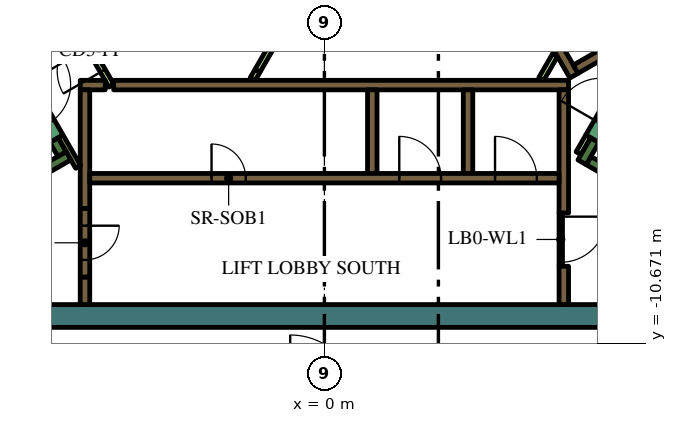
"""IFC4 building model, lengths in metres.
Left out: names, types, materials, properties, quantities, classifications, styles, units other than length and angle.
Written with IfcOpenShell. Run it as: python <this file> out.ifc"""

import sys

from ifc_helpers import new_model, si_unit, direction, frame, frame_2d, origin, place, context, subcontext, project, spatial, rectangle, extrude, element, fill, save


model = new_model("IFC4")
c1 = context("Model", 3, precision=1e-05, world=origin(), true_north=direction((0.0, 1.0)))
c2 = subcontext(c1, "Body", "Model", "MODEL_VIEW")
j1 = project(units=[si_unit("LENGTHUNIT", "METRE"), si_unit("PLANEANGLEUNIT", "RADIAN")], contexts=[c1])
p1 = place(None, origin())
s1 = spatial("IfcSite", under=j1, at=p1, CompositionType="ELEMENT")
p2 = place(p1, origin())
s2 = spatial("IfcBuilding", under=s1, at=p2, CompositionType="ELEMENT")
p3 = place(p2, frame((0.0, 0.0, 327.6)))
s3 = spatial("IfcBuildingStorey", under=s2, at=p3, CompositionType="ELEMENT", Elevation=327.6)
p4 = place(p3, frame((8.904, -9.95, 0.0), z_axis=(0.0, 0.0, 1.0), x_axis=(-1.0, 0.0, 0.0)))
e1 = element("IfcWall", 1, at=p4, inside=s3, PredefinedType="SOLIDWALL", context=c2, shape_type="SweptSolid", body=[
    extrude(rectangle(XDim=22.161, YDim=0.6, at=frame_2d((11.081, 0.0))), origin(), (0.0, 0.0, 1.0), 4.2),
])
p5 = place(p3, frame((12.84, -9.261, 0.0), z_axis=(0.0, 0.0, 1.0), x_axis=(-0.866013990052, 0.500019768644, 0.0)))
e2 = element("IfcWall", 2, at=p5, inside=s3, PredefinedType="SOLIDWALL", context=c2, shape_type="SweptSolid", body=[
    extrude(rectangle(XDim=6.8, YDim=0.25, at=frame_2d((3.4, 0.0))), origin(), (0.0, 0.0, 1.0), 4.2),
])
p6 = place(p3, frame((6.78, -5.906, 0.0), z_axis=(0.0, 0.0, 1.0), x_axis=(0.500223362819, 0.865896406789, 0.0)))
e3 = element("IfcWall", 3, at=p6, inside=s3, PredefinedType="SOLIDWALL", context=c2, shape_type="SweptSolid", body=[
    extrude(rectangle(XDim=0.675, YDim=0.25, at=frame_2d((0.337, 0.0))), origin(), (0.0, 0.0, 1.0), 4.2),
])
p7 = place(p3, frame((-12.84, -9.261, 0.0), z_axis=(0.0, 0.0, 1.0), x_axis=(0.866016039709, 0.500016218704, 0.0)))
e4 = element("IfcWall", 4, at=p7, inside=s3, PredefinedType="SOLIDWALL", context=c2, shape_type="SweptSolid", body=[
    extrude(rectangle(XDim=7.05, YDim=0.25, at=frame_2d((3.525, 0.0))), origin(), (0.0, 0.0, 1.0), 4.2),
])
p8 = place(p3, frame((-6.905, -5.69, 0.0), z_axis=(0.0, 0.0, 1.0), x_axis=(-0.500402024738, 0.865793170242, 0.0)))
e5 = element("IfcWall", 5, at=p8, inside=s3, PredefinedType="SOLIDWALL", context=c2, shape_type="SweptSolid", body=[
    extrude(rectangle(XDim=0.425, YDim=0.25, at=frame_2d((0.212, 0.0))), origin(), (0.0, 0.0, 1.0), 4.2),
])
p9 = place(p3, frame((-5.545, -3.875, 0.0), z_axis=(0.0, 0.0, 1.0), x_axis=(1.0, 0.0, 0.0)))
e6 = element("IfcWall", 6, at=p9, inside=s3, PredefinedType="SOLIDWALL", context=c2, shape_type="SweptSolid", body=[
    extrude(rectangle(XDim=11.97, YDim=0.25, at=frame_2d((5.985, 0.0))), origin(), (0.0, 0.0, 1.0), 4.2),
])
p10 = place(p3, frame((-6.425, -3.875, 0.0), z_axis=(0.0, 0.0, 1.0), x_axis=(1.0, 0.0, 0.0)))
e7 = element("IfcWall", 7, at=p10, inside=s3, PredefinedType="SOLIDWALL", context=c2, shape_type="SweptSolid", body=[
    extrude(rectangle(XDim=0.658, YDim=0.25, at=frame_2d((0.329, 0.0))), origin(), (0.0, 0.0, 1.0), 4.2),
])
p11 = place(p3, frame((6.3, -7.24, 0.0), z_axis=(0.0, 0.0, 1.0), x_axis=(0.0, 1.0, 0.0)))
e8 = element("IfcWall", 8, at=p11, inside=s3, PredefinedType="SOLIDWALL", context=c2, shape_type="SweptSolid", body=[
    extrude(rectangle(XDim=3.24, YDim=0.25, at=frame_2d((1.62, 0.0))), origin(), (0.0, 0.0, 1.0), 4.2),
])
p12 = place(p3, frame((6.3, -9.65, 0.0), z_axis=(0.0, 0.0, 1.0), x_axis=(0.0, 1.0, 0.0)))
e9 = element("IfcWall", 9, at=p12, inside=s3, PredefinedType="SOLIDWALL", context=c2, shape_type="SweptSolid", body=[
    extrude(rectangle(XDim=1.008, YDim=0.25, at=frame_2d((0.504, 0.0))), origin(), (0.0, 0.0, 1.0), 4.2),
])
for number, where, z_axis, x_axis in (
    (10, (3.78, -4.0, 0.0), (0.0, 0.0, 1.0), (0.0, -1.0, 0.0)),
    (11, (1.26, -4.0, 0.0), (0.0, 0.0, 1.0), (0.0, -1.0, 0.0)),
):
    element("IfcWall", number, at=place(p3, frame(where, z_axis=z_axis, x_axis=x_axis)), inside=s3, PredefinedType="SOLIDWALL", context=c2, shape_type="SweptSolid", body=[
        extrude(rectangle(XDim=2.2, YDim=0.25, at=frame_2d((1.1, 0.0))), origin(), (0.0, 0.0, 1.0), 4.2),
    ])
p13 = place(p3, frame((-6.3, -7.125, 0.0), z_axis=(0.0, 0.0, 1.0), x_axis=(0.0, 1.0, 0.0)))
e12 = element("IfcWall", 12, at=p13, inside=s3, PredefinedType="SOLIDWALL", context=c2, shape_type="SweptSolid", body=[
    extrude(rectangle(XDim=3.125, YDim=0.25, at=frame_2d((1.562, 0.0))), origin(), (0.0, 0.0, 1.0), 4.2),
])
p14 = place(p3, frame((-6.3, -8.925, 0.0), z_axis=(0.0, 0.0, 1.0), x_axis=(0.0, -1.0, 0.0)))
e13 = element("IfcWall", 13, at=p14, inside=s3, PredefinedType="SOLIDWALL", context=c2, shape_type="SweptSolid", body=[
    extrude(rectangle(XDim=0.725, YDim=0.25, at=frame_2d((0.363, 0.0))), origin(), (0.0, 0.0, 1.0), 4.2),
])
p15 = place(p3, frame((6.568, -3.627, 0.0), z_axis=(0.0, 0.0, 1.0), x_axis=(-0.499999455981, 0.866025717874, 0.0)))
e14 = element("IfcWall", 14, at=p15, inside=s3, PredefinedType="SOLIDWALL", context=c2, shape_type="SweptSolid", body=[
    extrude(rectangle(XDim=11.978, YDim=0.25, at=frame_2d((5.989, 0.0))), origin(), (0.0, 0.0, 1.0), 4.2),
])
p16 = place(p3, frame((6.614, -3.456, 0.0), z_axis=(0.0, 0.0, 1.0), x_axis=(0.866025089694, 0.500000544019, 0.0)))
e15 = element("IfcWall", 15, at=p16, inside=s3, PredefinedType="SOLIDWALL", context=c2, shape_type="SweptSolid", body=[
    extrude(rectangle(XDim=2.305, YDim=0.25, at=frame_2d((1.153, 0.0))), origin(), (0.0, 0.0, 1.0), 4.2),
])
p17 = place(p3, frame((-6.48, -6.027, 0.0), z_axis=(0.0, 0.0, 1.0), x_axis=(-0.499927229454, 0.866067413802, 0.0)))
e16 = element("IfcWall", 16, at=p17, inside=s3, PredefinedType="PARTITIONING", context=c2, shape_type="SweptSolid", body=[
    extrude(rectangle(XDim=0.929, YDim=0.15, at=frame_2d((0.464, 0.0))), origin(), (0.0, 0.0, 1.0), 4.2),
])
p18 = place(p3, frame((6.945, -5.222, 0.0), z_axis=(0.0, 0.0, 1.0), x_axis=(-0.499818422106, -0.866130212453, 0.0)))
e17 = element("IfcWall", 17, at=p18, inside=s3, PredefinedType="PARTITIONING", context=c2, shape_type="SweptSolid", body=[
    extrude(rectangle(XDim=0.514, YDim=0.15, at=frame_2d((0.257, 0.0))), origin(), (0.0, 0.0, 1.0), 3.45),
])
p19 = place(p3, frame((5.705, -3.718, 0.0), z_axis=(0.0, 0.0, 1.0), x_axis=(0.499962090823, 0.866047289552, 0.0)))
e18 = element("IfcWall", 18, at=p19, inside=s3, PredefinedType="PARTITIONING", context=c2, shape_type="SweptSolid", body=[
    extrude(rectangle(XDim=0.735, YDim=0.15, at=frame_2d((0.367, 0.0))), origin(), (0.0, 0.0, 1.0), 3.45),
])
p20 = place(p3, frame((-1.887, -3.718, 0.0), z_axis=(0.0, 0.0, 1.0), x_axis=(0.500165633897, 0.865929753888, 0.0)))
e19 = element("IfcWall", 19, at=p20, inside=s3, PredefinedType="PARTITIONING", context=c2, shape_type="SweptSolid", body=[
    extrude(rectangle(XDim=0.254, YDim=0.15, at=frame_2d((0.127, 0.0))), origin(), (0.0, 0.0, 1.0), 3.45),
])
p21 = place(p3, frame((-6.175, -6.325, 0.0), z_axis=(0.0, 0.0, 1.0), x_axis=(1.0, 0.0, 0.0)))
e20 = element("IfcWall", 20, at=p21, inside=s3, PredefinedType="SOLIDWALL", context=c2, shape_type="SweptSolid", body=[
    extrude(rectangle(XDim=12.35, YDim=0.25, at=frame_2d((6.175, 0.0))), origin(), (0.0, 0.0, 1.0), 4.2),
])
p22 = place(p21, frame((3.205, 0.0, 0.0)))
e21 = element("IfcOpeningElement", 21, at=p22, cuts=e20, PredefinedType="OPENING", context=c2, shape_type="SweptSolid", body=[
    extrude(rectangle(XDim=0.9, YDim=2.1, at=frame_2d((0.45, 1.05))), frame((0.0, 0.135, 0.0), z_axis=(0.0, -1.0, 0.0), x_axis=(1.0, 0.0, 0.0)), (0.0, 0.0, 1.0), 0.27),
])
p23 = place(p21, frame((8.145, 0.0, 0.0)))
e22 = element("IfcOpeningElement", 22, at=p23, cuts=e20, PredefinedType="OPENING", context=c2, shape_type="SweptSolid", body=[
    extrude(rectangle(XDim=1.1, YDim=2.1, at=frame_2d((0.55, 1.05))), frame((0.0, 0.135, 0.0), z_axis=(0.0, -1.0, 0.0), x_axis=(1.0, 0.0, 0.0)), (0.0, 0.0, 1.0), 0.27),
])
p24 = place(p21, frame((10.665, 0.0, 0.0)))
e23 = element("IfcOpeningElement", 23, at=p24, cuts=e20, PredefinedType="OPENING", context=c2, shape_type="SweptSolid", body=[
    extrude(rectangle(XDim=1.1, YDim=2.1, at=frame_2d((0.55, 1.05))), frame((0.0, 0.135, 0.0), z_axis=(0.0, -1.0, 0.0), x_axis=(1.0, 0.0, 0.0)), (0.0, 0.0, 1.0), 0.27),
])
p25 = place(p3, frame((7.053, -5.284, 0.0), z_axis=(0.0, 0.0, 1.0), x_axis=(0.500078061341, 0.865980330357, 0.0)))
e24 = element("IfcWall", 24, at=p25, inside=s3, PredefinedType="SOLIDWALL", context=c2, shape_type="SweptSolid", body=[
    extrude(rectangle(XDim=2.1, YDim=0.4, at=frame_2d((1.05, 0.0))), origin(), (0.0, 0.0, 1.0), 4.2),
])
p26 = place(p25, frame((0.45, 0.0, 0.0)))
e25 = element("IfcOpeningElement", 25, at=p26, cuts=e24, PredefinedType="OPENING", context=c2, shape_type="SweptSolid", body=[
    extrude(rectangle(XDim=1.2, YDim=2.1, at=frame_2d((0.6, 1.05))), frame((0.0, 0.21, 0.0), z_axis=(0.0, -1.0, 0.0), x_axis=(1.0, 0.0, 0.0)), (0.0, 0.0, 1.0), 0.42),
])
p27 = place(p3, frame((-8.103, -3.466, 0.0), z_axis=(0.0, 0.0, 1.0), x_axis=(0.500078061341, -0.865980330357, 0.0)))
e26 = element("IfcWall", 26, at=p27, inside=s3, PredefinedType="SOLIDWALL", context=c2, shape_type="SweptSolid", body=[
    extrude(rectangle(XDim=2.1, YDim=0.4, at=frame_2d((1.05, 0.0))), origin(), (0.0, 0.0, 1.0), 4.2),
])
p28 = place(p27, frame((0.45, 0.0, 0.0)))
e27 = element("IfcOpeningElement", 27, at=p28, cuts=e26, PredefinedType="OPENING", context=c2, shape_type="SweptSolid", body=[
    extrude(rectangle(XDim=1.2, YDim=2.1, at=frame_2d((0.6, 1.05))), frame((0.0, 0.21, 0.0), z_axis=(0.0, -1.0, 0.0), x_axis=(1.0, 0.0, 0.0)), (0.0, 0.0, 1.0), 0.42),
])
p29 = place(p3, frame((-6.3, -7.125, 0.0), z_axis=(0.0, 0.0, 1.0), x_axis=(0.0, -1.0, 0.0)))
e28 = element("IfcWall", 28, at=p29, inside=s3, PredefinedType="SOLIDWALL", context=c2, shape_type="SweptSolid", body=[
    extrude(rectangle(XDim=1.8, YDim=0.25, at=frame_2d((0.9, 0.0))), origin(), (0.0, 0.0, 1.0), 4.2),
])
p30 = place(p29, frame((0.45, 0.0, 0.0)))
e29 = element("IfcOpeningElement", 29, at=p30, cuts=e28, PredefinedType="OPENING", context=c2, shape_type="SweptSolid", body=[
    extrude(rectangle(XDim=0.9, YDim=2.1, at=frame_2d((0.45, 1.05))), frame((0.0, 0.135, 0.0), z_axis=(0.0, -1.0, 0.0), x_axis=(1.0, 0.0, 0.0)), (0.0, 0.0, 1.0), 0.27),
])
p31 = place(p3, frame((-1.76, -3.498, 0.0), z_axis=(0.0, 0.0, 1.0), x_axis=(0.499977374825, 0.866038466041, 0.0)))
e30 = element("IfcWall", 30, at=p31, inside=s3, PredefinedType="PARTITIONING", context=c2, shape_type="SweptSolid", body=[
    extrude(rectangle(XDim=2.1, YDim=0.15, at=frame_2d((1.05, 0.0))), origin(), (0.0, 0.0, 1.0), 3.45),
])
p32 = place(p31, frame((0.6, 0.0, 0.0)))
e31 = element("IfcOpeningElement", 31, at=p32, cuts=e30, PredefinedType="OPENING", context=c2, shape_type="SweptSolid", body=[
    extrude(rectangle(XDim=0.9, YDim=2.1, at=frame_2d((0.45, 1.05))), frame((0.0, 0.085, 0.0), z_axis=(0.0, -1.0, 0.0), x_axis=(1.0, 0.0, 0.0)), (0.0, 0.0, 1.0), 0.17),
])
p33 = place(p3, frame((-5.606, -3.89, 0.0), z_axis=(0.0, 0.0, 1.0), x_axis=(-0.500027713859, 0.866009402589, 0.0)))
e32 = element("IfcWall", 32, at=p33, inside=s3, PredefinedType="PARTITIONING", context=c2, shape_type="SweptSolid", body=[
    extrude(rectangle(XDim=2.1, YDim=0.15, at=frame_2d((1.05, 0.0))), origin(), (0.0, 0.0, 1.0), 3.45),
])
p34 = place(p33, frame((0.45, 0.0, 0.0)))
e33 = element("IfcOpeningElement", 33, at=p34, cuts=e32, PredefinedType="OPENING", context=c2, shape_type="SweptSolid", body=[
    extrude(rectangle(XDim=1.2, YDim=2.1, at=frame_2d((0.6, 1.05))), frame((0.0, 0.085, 0.0), z_axis=(0.0, -1.0, 0.0), x_axis=(1.0, 0.0, 0.0)), (0.0, 0.0, 1.0), 0.17),
])
p35 = place(p3, frame((6.22, -7.237, 0.0), z_axis=(0.0, 0.0, 1.0), x_axis=(0.0, -1.0, 0.0)))
e34 = element("IfcWall", 34, at=p35, inside=s3, PredefinedType="PARTITIONING", context=c2, shape_type="SweptSolid", body=[
    extrude(rectangle(XDim=1.4, YDim=0.09, at=frame_2d((0.7, 0.0))), origin(), (0.0, 0.0, 1.0), 3.45),
])
p36 = place(p35, frame((0.1, 0.0, 0.0)))
e35 = element("IfcOpeningElement", 35, at=p36, cuts=e34, PredefinedType="OPENING", context=c2, shape_type="SweptSolid", body=[
    extrude(rectangle(XDim=1.2, YDim=2.1, at=frame_2d((0.6, 1.05))), frame((0.0, 0.055, 0.0), z_axis=(0.0, -1.0, 0.0), x_axis=(1.0, 0.0, 0.0)), (0.0, 0.0, 1.0), 0.11),
])
p37 = place(p22, origin())
e36 = element("IfcDoor", 36, at=p37, inside=s3, OperationType="SINGLE_SWING_LEFT", PredefinedType="DOOR", context=c2, shape_type="SweptSolid", body=[
    extrude(rectangle(XDim=0.9, YDim=2.1, at=frame_2d((0.45, 1.05))), frame((0.0, 0.025, 0.0), z_axis=(0.0, -1.0, 0.0), x_axis=(1.0, 0.0, 0.0)), (0.0, 0.0, 1.0), 0.05),
])
fill(e21, e36)
p38 = place(p23, origin())
e37 = element("IfcDoor", 37, at=p38, inside=s3, OperationType="DOUBLE_DOOR_SLIDING", PredefinedType="DOOR", context=c2, shape_type="SweptSolid", body=[
    extrude(rectangle(XDim=1.1, YDim=2.1, at=frame_2d((0.55, 1.05))), frame((0.0, 0.025, 0.0), z_axis=(0.0, -1.0, 0.0), x_axis=(1.0, 0.0, 0.0)), (0.0, 0.0, 1.0), 0.05),
])
fill(e22, e37)
p39 = place(p24, origin())
e38 = element("IfcDoor", 38, at=p39, inside=s3, OperationType="DOUBLE_DOOR_SLIDING", PredefinedType="DOOR", context=c2, shape_type="SweptSolid", body=[
    extrude(rectangle(XDim=1.1, YDim=2.1, at=frame_2d((0.55, 1.05))), frame((0.0, 0.025, 0.0), z_axis=(0.0, -1.0, 0.0), x_axis=(1.0, 0.0, 0.0)), (0.0, 0.0, 1.0), 0.05),
])
fill(e23, e38)
p40 = place(p30, origin())
e39 = element("IfcDoor", 39, at=p40, inside=s3, OperationType="SINGLE_SWING_LEFT", PredefinedType="DOOR", context=c2, shape_type="SweptSolid", body=[
    extrude(rectangle(XDim=0.9, YDim=2.1, at=frame_2d((0.45, 1.05))), frame((0.0, 0.025, 0.0), z_axis=(0.0, -1.0, 0.0), x_axis=(1.0, 0.0, 0.0)), (0.0, 0.0, 1.0), 0.05),
])
fill(e29, e39)
p41 = place(p34, origin())
e40 = element("IfcDoor", 40, at=p41, inside=s3, OperationType="SINGLE_SWING_LEFT", PredefinedType="DOOR", context=c2, shape_type="SweptSolid", body=[
    extrude(rectangle(XDim=1.2, YDim=2.1, at=frame_2d((0.6, 1.05))), frame((0.0, 0.025, 0.0), z_axis=(0.0, -1.0, 0.0), x_axis=(1.0, 0.0, 0.0)), (0.0, 0.0, 1.0), 0.05),
])
fill(e33, e40)
p42 = place(p36, origin())
e41 = element("IfcDoor", 41, at=p42, inside=s3, OperationType="SINGLE_SWING_LEFT", PredefinedType="DOOR", context=c2, shape_type="SweptSolid", body=[
    extrude(rectangle(XDim=1.2, YDim=2.1, at=frame_2d((0.6, 1.05))), frame((0.0, 0.025, 0.0), z_axis=(0.0, -1.0, 0.0), x_axis=(1.0, 0.0, 0.0)), (0.0, 0.0, 1.0), 0.05),
])
fill(e35, e41)
save(model, sys.argv[1])
